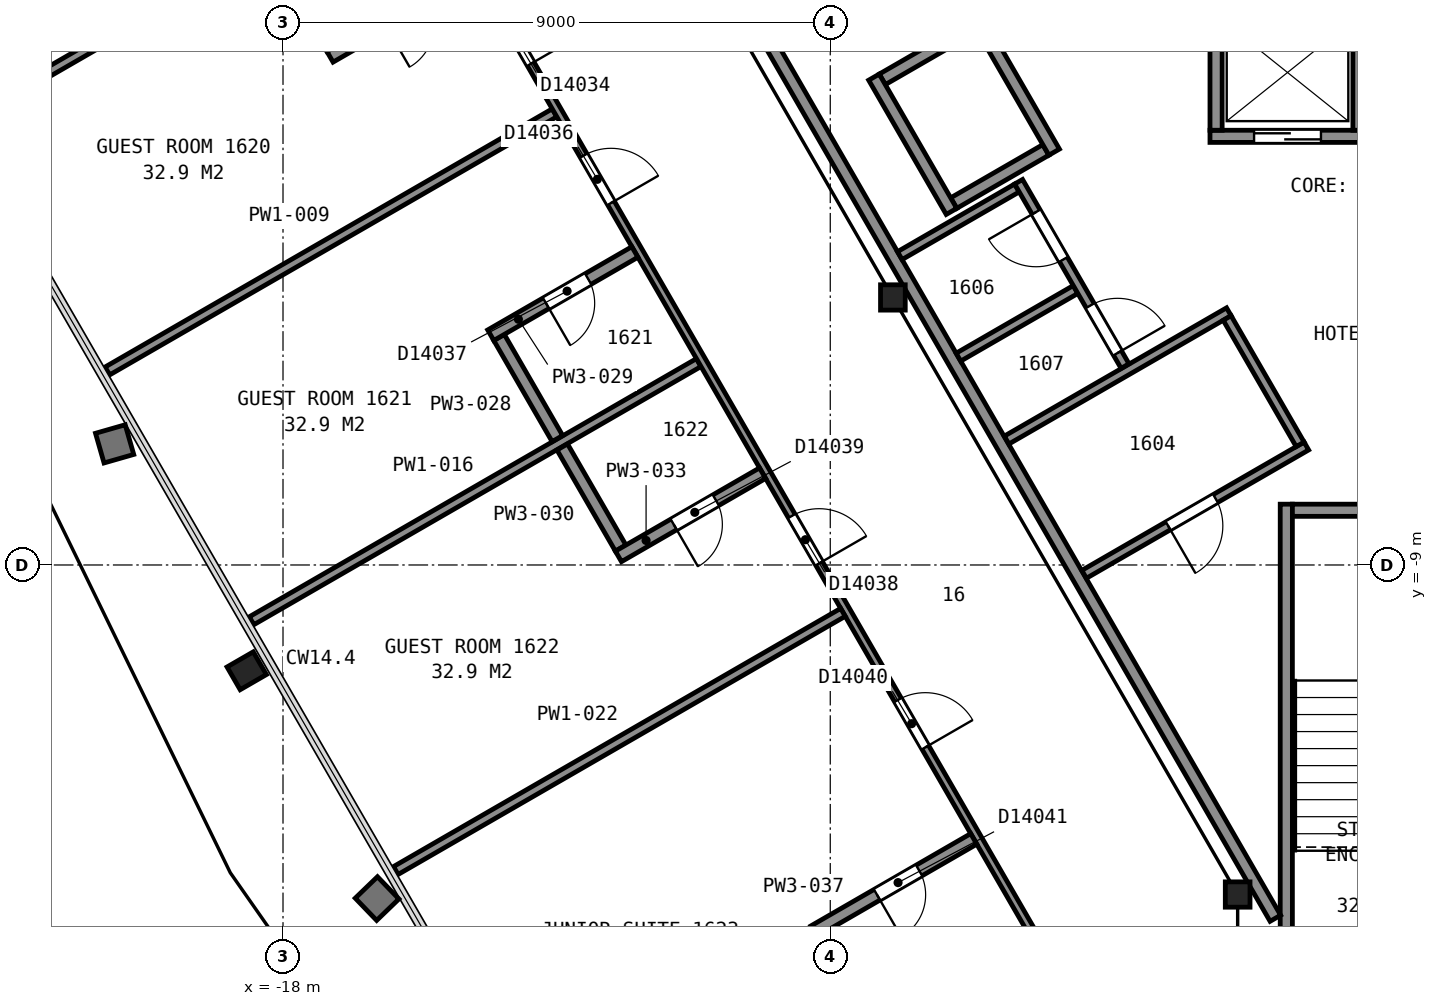
"""IFC4 building model, lengths in metres.
Left out: names, types, materials, properties, quantities, classifications, styles, units other than length and angle.
Written with IfcOpenShell. Run it as: python <this file> out.ifc"""

import sys

from ifc_helpers import new_model, si_unit, direction, frame, frame_2d, origin, origin_2d, place, context, subcontext, project, spatial, rectangle, i_section, extrude, element, fill, save


model = new_model("IFC4")
c1 = context("Model", 3, precision=1e-05, world=origin(), true_north=direction((0.0, 1.0)))
c2 = subcontext(c1, "Body", "Model", "MODEL_VIEW")
j1 = project(units=[si_unit("LENGTHUNIT", "METRE"), si_unit("PLANEANGLEUNIT", "RADIAN")], contexts=[c1])
p1 = place(None, origin())
s1 = spatial("IfcSite", under=j1, at=p1, CompositionType="ELEMENT")
p2 = place(p1, origin())
s2 = spatial("IfcBuilding", under=s1, at=p2, CompositionType="ELEMENT")
p3 = place(p2, frame((0.0, 0.0, 72.8)))
s3 = spatial("IfcBuildingStorey", under=s2, at=p3, CompositionType="ELEMENT", Elevation=72.8)
p4 = place(p3, frame((-18.512, -10.691, 0.025), z_axis=(-0.07202792121, -0.041599379805, 0.996534731038), x_axis=(-0.500403695, 0.865792204467, -2.6711735e-05)))
e1 = element("IfcColumn", 1, at=p4, inside=s3, PredefinedType="COLUMN", context=c2, shape_type="SweptSolid", body=[
    extrude(i_section(OverallWidth=0.432, OverallDepth=0.498, WebThickness=0.056, FlangeThickness=0.089, FilletRadius=0.015, at=origin_2d()), origin(), (0.0, 0.0, 1.0), 3.562),
])
for number, where, z_axis, x_axis in (
    (2, (-7.97, -4.6, 0.0), (0.0, 0.0, 1.0), (1.0, 0.0, 0.0)),
    (3, (-2.3, -14.42, 0.0), (0.0, 0.0, 1.0), (1.0, 0.0, 0.0)),
):
    element("IfcColumn", number, at=place(p3, frame(where, z_axis=z_axis, x_axis=x_axis)), inside=s3, PredefinedType="COLUMN", context=c2, shape_type="SweptSolid", body=[
        extrude(i_section(OverallWidth=0.406, OverallDepth=0.417, WebThickness=0.03, FlangeThickness=0.048, FilletRadius=0.015, at=origin_2d()), origin(), (0.0, 0.0, 1.0), 3.6),
    ])
p5 = place(p3, frame((-1.5, -8.0, 0.0), z_axis=(0.0, 0.0, 1.0), x_axis=(0.0, -1.0, 0.0)))
e4 = element("IfcWall", 4, at=p5, inside=s3, PredefinedType="PARTITIONING", context=c2, shape_type="SweptSolid", body=[
    extrude(rectangle(XDim=12.0, YDim=0.2, at=frame_2d((6.0, 0.0))), origin(), (0.0, 0.0, 1.0), 3.35),
])
p6 = place(p3, frame((-1.4, -8.1, 0.0), z_axis=(0.0, 0.0, 1.0), x_axis=(1.0, 0.0, 0.0)))
e5 = element("IfcWall", 5, at=p6, inside=s3, PredefinedType="PARTITIONING", context=c2, shape_type="SweptSolid", body=[
    extrude(rectangle(XDim=2.8, YDim=0.2, at=frame_2d((1.4, 0.0))), origin(), (0.0, 0.0, 1.0), 3.35),
])
p7 = place(p3, frame((-2.755, -1.95, 0.0), z_axis=(0.0, 0.0, 1.0), x_axis=(1.0, 0.0, 0.0)))
e6 = element("IfcWall", 6, at=p7, inside=s3, PredefinedType="PARTITIONING", context=c2, shape_type="SweptSolid", body=[
    extrude(rectangle(XDim=2.55, YDim=0.2, at=frame_2d((1.275, 0.0))), origin(), (0.0, 0.0, 1.0), 3.6),
])
p8 = place(p7, frame((0.725, 0.0, 0.0)))
e7 = element("IfcOpeningElement", 7, at=p8, cuts=e6, PredefinedType="OPENING", context=c2, shape_type="SweptSolid", body=[
    extrude(rectangle(XDim=1.1, YDim=2.1, at=frame_2d((0.55, 1.05))), frame((0.0, 0.11, 0.0), z_axis=(0.0, -1.0, 0.0), x_axis=(1.0, 0.0, 0.0)), (0.0, 0.0, 1.0), 0.22),
])
p9 = place(p3, frame((-6.97, -3.048, 0.0), z_axis=(0.0, 0.0, 1.0), x_axis=(0.866036909293, 0.499980071345, 0.0)))
e8 = element("IfcWall", 8, at=p9, inside=s3, PredefinedType="PARTITIONING", context=c2, shape_type="SweptSolid", body=[
    extrude(rectangle(XDim=1.75, YDim=0.2, at=frame_2d((0.875, 0.0))), origin(), (0.0, 0.0, 1.0), 3.6),
])
p10 = place(p3, frame((-8.145, -1.013, 0.0), z_axis=(0.0, 0.0, 1.0), x_axis=(0.866016494683, 0.500015430699, 0.0)))
e9 = element("IfcWall", 9, at=p10, inside=s3, PredefinedType="PARTITIONING", context=c2, shape_type="SweptSolid", body=[
    extrude(rectangle(XDim=3.15, YDim=0.2, at=frame_2d((1.575, 0.0))), origin(), (0.0, 0.0, 1.0), 3.6),
])
for number, where, z_axis, x_axis in (
    (10, (-0.305, -1.85, 0.0), (0.0, 0.0, 1.0), (0.0, 1.0, 0.0)),
    (11, (-2.655, -1.85, 0.0), (0.0, 0.0, 1.0), (0.0, 1.0, 0.0)),
):
    element("IfcWall", number, at=place(p3, frame(where, z_axis=z_axis, x_axis=x_axis)), inside=s3, PredefinedType="PARTITIONING", context=c2, shape_type="SweptSolid", body=[
        extrude(rectangle(XDim=1.75, YDim=0.2, at=frame_2d((0.875, 0.0))), origin(), (0.0, 0.0, 1.0), 3.6),
    ])
p11 = place(p3, frame((-5.318, -2.21, 0.0), z_axis=(0.0, 0.0, 1.0), x_axis=(-0.499938297808, 0.866061024631, 0.0)))
e12 = element("IfcWall", 12, at=p11, inside=s3, PredefinedType="PARTITIONING", context=c2, shape_type="SweptSolid", body=[
    extrude(rectangle(XDim=2.35, YDim=0.2, at=frame_2d((1.175, 0.0))), origin(), (0.0, 0.0, 1.0), 3.6),
])
p12 = place(p3, frame((-7.006, -3.185, 0.0), z_axis=(0.0, 0.0, 1.0), x_axis=(-0.499990435942, 0.866030925526, 0.0)))
e13 = element("IfcWall", 13, at=p12, inside=s3, PredefinedType="PARTITIONING", context=c2, shape_type="SweptSolid", body=[
    extrude(rectangle(XDim=2.55, YDim=0.2, at=frame_2d((1.275, 0.0))), origin(), (0.0, 0.0, 1.0), 3.6),
])
p13 = place(p3, frame((-13.664, 5.946, 0.0), z_axis=(0.0, 0.0, 1.0), x_axis=(0.499994327219, -0.866028678941, 0.0)))
e14 = element("IfcWall", 14, at=p13, inside=s3, PredefinedType="PARTITIONING", context=c2, shape_type="SweptSolid", body=[
    extrude(rectangle(XDim=23.968, YDim=0.2, at=frame_2d((11.984, 0.0))), origin(), (0.0, 0.0, 1.0), 3.35),
])
p14 = place(p3, frame((-7.856, -3.912, 0.0), z_axis=(0.0, 0.0, 1.0), x_axis=(0.865971748, 0.500092923031, 0.0)))
e15 = element("IfcWall", 15, at=p14, inside=s3, PredefinedType="PARTITIONING", context=c2, shape_type="SweptSolid", body=[
    extrude(rectangle(XDim=2.225, YDim=0.15, at=frame_2d((1.112, 0.0))), origin(), (0.0, 0.0, 1.0), 3.35),
])
p15 = place(p3, frame((-6.892, -5.582, 0.0), z_axis=(0.0, 0.0, 1.0), x_axis=(0.865944298464, 0.500140452231, 0.0)))
e16 = element("IfcWall", 16, at=p15, inside=s3, PredefinedType="PARTITIONING", context=c2, shape_type="SweptSolid", body=[
    extrude(rectangle(XDim=2.224, YDim=0.15, at=frame_2d((1.112, 0.0))), origin(), (0.0, 0.0, 1.0), 3.35),
])
p16 = place(p3, frame((-6.1, -6.946, 0.0), z_axis=(0.0, 0.0, 1.0), x_axis=(0.866038200431, 0.499977834903, 0.0)))
e17 = element("IfcWall", 17, at=p16, inside=s3, PredefinedType="PARTITIONING", context=c2, shape_type="SweptSolid", body=[
    extrude(rectangle(XDim=4.22, YDim=0.15, at=frame_2d((2.11, 0.0))), origin(), (0.0, 0.0, 1.0), 3.35),
])
p17 = place(p3, frame((-4.152, -5.729, 0.0), z_axis=(0.0, 0.0, 1.0), x_axis=(-0.500024287448, 0.866011380966, 0.0)))
e18 = element("IfcWall", 18, at=p17, inside=s3, PredefinedType="PARTITIONING", context=c2, shape_type="SweptSolid", body=[
    extrude(rectangle(XDim=3.501, YDim=0.15, at=frame_2d((1.75, 0.0))), origin(), (0.0, 0.0, 1.0), 3.35),
])
p18 = place(p17, frame((2.026, 0.0, 0.0)))
e19 = element("IfcOpeningElement", 19, at=p18, cuts=e18, PredefinedType="OPENING", context=c2, shape_type="SweptSolid", body=[
    extrude(rectangle(XDim=0.9, YDim=2.1, at=frame_2d((0.45, 1.05))), frame((0.0, 0.085, 0.0), z_axis=(0.0, -1.0, 0.0), x_axis=(1.0, 0.0, 0.0)), (0.0, 0.0, 1.0), 0.17),
])
p19 = place(p17, frame((0.248, 0.0, 0.0)))
e20 = element("IfcOpeningElement", 20, at=p19, cuts=e18, PredefinedType="OPENING", context=c2, shape_type="SweptSolid", body=[
    extrude(rectangle(XDim=0.9, YDim=2.1, at=frame_2d((0.45, 1.05))), frame((0.0, 0.085, 0.0), z_axis=(0.0, -1.0, 0.0), x_axis=(1.0, 0.0, 0.0)), (0.0, 0.0, 1.0), 0.17),
])
p20 = place(p3, frame((-4.825, -9.154, 0.0), z_axis=(0.0, 0.0, 1.0), x_axis=(0.866023738697, 0.500002884005, 0.0)))
e21 = element("IfcWall", 21, at=p20, inside=s3, PredefinedType="PARTITIONING", context=c2, shape_type="SweptSolid", body=[
    extrude(rectangle(XDim=4.22, YDim=0.15, at=frame_2d((2.11, 0.0))), origin(), (0.0, 0.0, 1.0), 3.35),
])
p21 = place(p20, frame((1.595, 0.0, 0.0)))
e22 = element("IfcOpeningElement", 22, at=p21, cuts=e21, PredefinedType="OPENING", context=c2, shape_type="SweptSolid", body=[
    extrude(rectangle(XDim=0.9, YDim=2.1, at=frame_2d((0.45, 1.05))), frame((0.0, 0.085, 0.0), z_axis=(0.0, -1.0, 0.0), x_axis=(1.0, 0.0, 0.0)), (0.0, 0.0, 1.0), 0.17),
])
p22 = place(p3, frame((-2.472, -4.938, 0.0), z_axis=(0.0, 0.0, 1.0), x_axis=(0.500045362686, -0.865999212041, 0.0)))
e23 = element("IfcWall", 23, at=p22, inside=s3, PredefinedType="PARTITIONING", context=c2, shape_type="SweptSolid", body=[
    extrude(rectangle(XDim=2.4, YDim=0.15, at=frame_2d((1.2, 0.0))), origin(), (0.0, 0.0, 1.0), 3.35),
])
p23 = place(p3, frame((-23.26, -1.701, 0.0), z_axis=(0.0, 0.0, 1.0), x_axis=(0.866027021296, 0.499997198377, 0.0)))
e24 = element("IfcWall", 24, at=p23, inside=s3, PredefinedType="PARTITIONING", context=c2, shape_type="SweptSolid", body=[
    extrude(rectangle(XDim=8.487, YDim=0.15, at=frame_2d((4.243, 0.0))), origin(), (0.0, 0.0, 1.0), 2.613),
])
p24 = place(p3, frame((-20.889, -5.809, 0.0), z_axis=(0.0, 0.0, 1.0), x_axis=(0.866022790583, 0.50000452617, 0.0)))
e25 = element("IfcWall", 25, at=p24, inside=s3, PredefinedType="PARTITIONING", context=c2, shape_type="SweptSolid", body=[
    extrude(rectangle(XDim=8.491, YDim=0.15, at=frame_2d((4.246, 0.0))), origin(), (0.0, 0.0, 1.0), 2.613),
])
p25 = place(p3, frame((-18.517, -9.917, 0.0), z_axis=(0.0, 0.0, 1.0), x_axis=(0.866017528739, 0.50001363973, 0.0)))
e26 = element("IfcWall", 26, at=p25, inside=s3, PredefinedType="PARTITIONING", context=c2, shape_type="SweptSolid", body=[
    extrude(rectangle(XDim=8.491, YDim=0.15, at=frame_2d((4.246, 0.0))), origin(), (0.0, 0.0, 1.0), 2.613),
])
p26 = place(p3, frame((-3.766, -18.358, 0.0), z_axis=(0.0, 0.0, 1.0), x_axis=(-0.500003973642, 0.866023109589, 0.0)))
e27 = element("IfcWall", 27, at=p26, inside=s3, PredefinedType="PARTITIONING", context=c2, shape_type="SweptSolid", body=[
    extrude(rectangle(XDim=28.826, YDim=0.125, at=frame_2d((14.413, 0.0))), origin(), (0.0, 0.0, 1.0), 2.613),
])
p27 = place(p26, frame((27.114, 0.0, 0.0)))
e28 = element("IfcOpeningElement", 28, at=p27, cuts=e27, PredefinedType="OPENING", context=c2, shape_type="SweptSolid", body=[
    extrude(rectangle(XDim=0.9, YDim=2.1, at=frame_2d((0.45, 1.05))), frame((0.0, 0.073, 0.0), z_axis=(0.0, -1.0, 0.0), x_axis=(1.0, 0.0, 0.0)), (0.0, 0.0, 1.0), 0.145),
])
p28 = place(p26, frame((20.322, 0.0, 0.0)))
e29 = element("IfcOpeningElement", 29, at=p28, cuts=e27, PredefinedType="OPENING", context=c2, shape_type="SweptSolid", body=[
    extrude(rectangle(XDim=0.9, YDim=2.1, at=frame_2d((0.45, 1.05))), frame((0.0, 0.073, 0.0), z_axis=(0.0, -1.0, 0.0), x_axis=(1.0, 0.0, 0.0)), (0.0, 0.0, 1.0), 0.145),
])
p29 = place(p26, frame((17.68, 0.0, 0.0)))
e30 = element("IfcOpeningElement", 30, at=p29, cuts=e27, PredefinedType="OPENING", context=c2, shape_type="SweptSolid", body=[
    extrude(rectangle(XDim=0.9, YDim=2.1, at=frame_2d((0.45, 1.05))), frame((0.0, 0.073, 0.0), z_axis=(0.0, -1.0, 0.0), x_axis=(1.0, 0.0, 0.0)), (0.0, 0.0, 1.0), 0.145),
])
p30 = place(p26, frame((10.836, 0.0, 0.0)))
e31 = element("IfcOpeningElement", 31, at=p30, cuts=e27, PredefinedType="OPENING", context=c2, shape_type="SweptSolid", body=[
    extrude(rectangle(XDim=0.9, YDim=2.1, at=frame_2d((0.45, 1.05))), frame((0.0, 0.073, 0.0), z_axis=(0.0, -1.0, 0.0), x_axis=(1.0, 0.0, 0.0)), (0.0, 0.0, 1.0), 0.145),
])
p31 = place(p26, frame((7.342, 0.0, 0.0)))
e32 = element("IfcOpeningElement", 32, at=p31, cuts=e27, PredefinedType="OPENING", context=c2, shape_type="SweptSolid", body=[
    extrude(rectangle(XDim=0.9, YDim=2.1, at=frame_2d((0.45, 1.05))), frame((0.0, 0.073, 0.0), z_axis=(0.0, -1.0, 0.0), x_axis=(1.0, 0.0, 0.0)), (0.0, 0.0, 1.0), 0.145),
])
p32 = place(p3, frame((-17.227, -0.643, 0.0), z_axis=(0.0, 0.0, 1.0), x_axis=(0.866012976267, 0.500021524473, 0.0)))
e33 = element("IfcWall", 33, at=p32, inside=s3, PredefinedType="PARTITIONING", context=c2, shape_type="SweptSolid", body=[
    extrude(rectangle(XDim=2.732, YDim=0.2, at=frame_2d((1.366, 0.0))), origin(), (0.0, 0.0, 1.0), 2.613),
])
p33 = place(p32, frame((1.05, 0.0, 0.0)))
e34 = element("IfcOpeningElement", 34, at=p33, cuts=e33, PredefinedType="OPENING", context=c2, shape_type="SweptSolid", body=[
    extrude(rectangle(XDim=0.8, YDim=2.1, at=frame_2d((0.4, 1.05))), frame((0.0, 0.11, 0.0), z_axis=(0.0, -1.0, 0.0), x_axis=(1.0, 0.0, 0.0)), (0.0, 0.0, 1.0), 0.22),
])
p34 = place(p3, frame((-16.145, -14.025, 0.0), z_axis=(0.0, 0.0, 1.0), x_axis=(0.866024716685, 0.500001190089, 0.0)))
e35 = element("IfcWall", 35, at=p34, inside=s3, PredefinedType="PARTITIONING", context=c2, shape_type="SweptSolid", body=[
    extrude(rectangle(XDim=8.492, YDim=0.15, at=frame_2d((4.246, 0.0))), origin(), (0.0, 0.0, 1.0), 2.613),
])
p35 = place(p3, frame((-14.447, -5.258, 0.0), z_axis=(0.0, 0.0, 1.0), x_axis=(0.499667418833, -0.866217334482, 0.0)))
e36 = element("IfcWall", 36, at=p35, inside=s3, PredefinedType="PARTITIONING", context=c2, shape_type="SweptSolid", body=[
    extrude(rectangle(XDim=1.92, YDim=0.2, at=frame_2d((0.96, 0.0))), origin(), (0.0, 0.0, 1.0), 2.613),
])
p36 = place(p3, frame((-12.213, -3.852, 0.0), z_axis=(0.0, 0.0, 1.0), x_axis=(-0.866005850709, -0.50003386539, 0.0)))
e37 = element("IfcWall", 37, at=p36, inside=s3, PredefinedType="PARTITIONING", context=c2, shape_type="SweptSolid", body=[
    extrude(rectangle(XDim=2.737, YDim=0.2, at=frame_2d((1.369, 0.0))), origin(), (0.0, 0.0, 1.0), 2.613),
])
p37 = place(p36, frame((0.887, 0.0, 0.0)))
e38 = element("IfcOpeningElement", 38, at=p37, cuts=e37, PredefinedType="OPENING", context=c2, shape_type="SweptSolid", body=[
    extrude(rectangle(XDim=0.8, YDim=2.1, at=frame_2d((0.4, 1.05))), frame((0.0, 0.11, 0.0), z_axis=(0.0, -1.0, 0.0), x_axis=(1.0, 0.0, 0.0)), (0.0, 0.0, 1.0), 0.22),
])
p38 = place(p3, frame((-13.407, -7.059, 0.0), z_axis=(0.0, 0.0, 1.0), x_axis=(0.499993829411, -0.866028966346, 0.0)))
e39 = element("IfcWall", 39, at=p38, inside=s3, PredefinedType="PARTITIONING", context=c2, shape_type="SweptSolid", body=[
    extrude(rectangle(XDim=1.921, YDim=0.2, at=frame_2d((0.96, 0.0))), origin(), (0.0, 0.0, 1.0), 2.613),
])
p39 = place(p3, frame((-12.484, -8.859, 0.0), z_axis=(0.0, 0.0, 1.0), x_axis=(0.866028150195, 0.499995243048, 0.0)))
e40 = element("IfcWall", 40, at=p39, inside=s3, PredefinedType="PARTITIONING", context=c2, shape_type="SweptSolid", body=[
    extrude(rectangle(XDim=2.737, YDim=0.2, at=frame_2d((1.369, 0.0))), origin(), (0.0, 0.0, 1.0), 2.613),
])
p40 = place(p39, frame((1.05, 0.0, 0.0)))
e41 = element("IfcOpeningElement", 41, at=p40, cuts=e40, PredefinedType="OPENING", context=c2, shape_type="SweptSolid", body=[
    extrude(rectangle(XDim=0.8, YDim=2.1, at=frame_2d((0.4, 1.05))), frame((0.0, 0.11, 0.0), z_axis=(0.0, -1.0, 0.0), x_axis=(1.0, 0.0, 0.0)), (0.0, 0.0, 1.0), 0.22),
])
p41 = place(p3, frame((-6.64, -13.505, 0.0), z_axis=(0.0, 0.0, 1.0), x_axis=(-0.866038344573, -0.499977585228, 0.0)))
e42 = element("IfcWall", 42, at=p41, inside=s3, PredefinedType="PARTITIONING", context=c2, shape_type="SweptSolid", body=[
    extrude(rectangle(XDim=3.037, YDim=0.2, at=frame_2d((1.519, 0.0))), origin(), (0.0, 0.0, 1.0), 2.613),
])
p42 = place(p41, frame((1.037, 0.0, 0.0)))
e43 = element("IfcOpeningElement", 43, at=p42, cuts=e42, PredefinedType="OPENING", context=c2, shape_type="SweptSolid", body=[
    extrude(rectangle(XDim=0.8, YDim=2.1, at=frame_2d((0.4, 1.05))), frame((0.0, 0.11, 0.0), z_axis=(0.0, -1.0, 0.0), x_axis=(1.0, 0.0, 0.0)), (0.0, 0.0, 1.0), 0.22),
])
p43 = place(p8, origin())
e44 = element("IfcDoor", 44, at=p43, inside=s3, OperationType="SLIDING_TO_RIGHT", PredefinedType="DOOR", context=c2, shape_type="SweptSolid", body=[
    extrude(rectangle(XDim=1.1, YDim=2.1, at=frame_2d((0.55, 1.05))), frame((0.0, 0.025, 0.0), z_axis=(0.0, -1.0, 0.0), x_axis=(1.0, 0.0, 0.0)), (0.0, 0.0, 1.0), 0.05),
])
fill(e7, e44)
p44 = place(p18, origin())
e45 = element("IfcDoor", 45, at=p44, inside=s3, OperationType="SINGLE_SWING_RIGHT", PredefinedType="DOOR", context=c2, shape_type="SweptSolid", body=[
    extrude(rectangle(XDim=0.9, YDim=2.1, at=frame_2d((0.45, 1.05))), frame((0.0, 0.025, 0.0), z_axis=(0.0, -1.0, 0.0), x_axis=(1.0, 0.0, 0.0)), (0.0, 0.0, 1.0), 0.05),
])
fill(e19, e45)
p45 = place(p19, origin())
e46 = element("IfcDoor", 46, at=p45, inside=s3, OperationType="SINGLE_SWING_LEFT", PredefinedType="DOOR", context=c2, shape_type="SweptSolid", body=[
    extrude(rectangle(XDim=0.9, YDim=2.1, at=frame_2d((0.45, 1.05))), frame((0.0, 0.025, 0.0), z_axis=(0.0, -1.0, 0.0), x_axis=(1.0, 0.0, 0.0)), (0.0, 0.0, 1.0), 0.05),
])
fill(e20, e46)
p46 = place(p21, origin())
e47 = element("IfcDoor", 47, at=p46, inside=s3, OperationType="SINGLE_SWING_LEFT", PredefinedType="DOOR", context=c2, shape_type="SweptSolid", body=[
    extrude(rectangle(XDim=0.9, YDim=2.1, at=frame_2d((0.45, 1.05))), frame((0.0, 0.025, 0.0), z_axis=(0.0, -1.0, 0.0), x_axis=(1.0, 0.0, 0.0)), (0.0, 0.0, 1.0), 0.05),
])
fill(e22, e47)
p47 = place(p28, origin())
e48 = element("IfcDoor", 48, at=p47, inside=s3, OperationType="SINGLE_SWING_LEFT", PredefinedType="DOOR", context=c2, shape_type="SweptSolid", body=[
    extrude(rectangle(XDim=0.9, YDim=2.1, at=frame_2d((0.45, 1.05))), frame((0.0, 0.025, 0.0), z_axis=(0.0, -1.0, 0.0), x_axis=(1.0, 0.0, 0.0)), (0.0, 0.0, 1.0), 0.05),
])
fill(e29, e48)
p48 = place(p29, origin())
e49 = element("IfcDoor", 49, at=p48, inside=s3, OperationType="SINGLE_SWING_LEFT", PredefinedType="DOOR", context=c2, shape_type="SweptSolid", body=[
    extrude(rectangle(XDim=0.9, YDim=2.1, at=frame_2d((0.45, 1.05))), frame((0.0, 0.025, 0.0), z_axis=(0.0, -1.0, 0.0), x_axis=(1.0, 0.0, 0.0)), (0.0, 0.0, 1.0), 0.05),
])
fill(e30, e49)
p49 = place(p30, origin())
e50 = element("IfcDoor", 50, at=p49, inside=s3, OperationType="SINGLE_SWING_LEFT", PredefinedType="DOOR", context=c2, shape_type="SweptSolid", body=[
    extrude(rectangle(XDim=0.9, YDim=2.1, at=frame_2d((0.45, 1.05))), frame((0.0, 0.025, 0.0), z_axis=(0.0, -1.0, 0.0), x_axis=(1.0, 0.0, 0.0)), (0.0, 0.0, 1.0), 0.05),
])
fill(e31, e50)
p50 = place(p31, origin())
e51 = element("IfcDoor", 51, at=p50, inside=s3, OperationType="SINGLE_SWING_LEFT", PredefinedType="DOOR", context=c2, shape_type="SweptSolid", body=[
    extrude(rectangle(XDim=0.9, YDim=2.1, at=frame_2d((0.45, 1.05))), frame((0.0, 0.025, 0.0), z_axis=(0.0, -1.0, 0.0), x_axis=(1.0, 0.0, 0.0)), (0.0, 0.0, 1.0), 0.05),
])
fill(e32, e51)
p51 = place(p37, origin())
e52 = element("IfcDoor", 52, at=p51, inside=s3, OperationType="SINGLE_SWING_RIGHT", PredefinedType="DOOR", context=c2, shape_type="SweptSolid", body=[
    extrude(rectangle(XDim=0.8, YDim=2.1, at=frame_2d((0.4, 1.05))), frame((0.0, 0.025, 0.0), z_axis=(0.0, -1.0, 0.0), x_axis=(1.0, 0.0, 0.0)), (0.0, 0.0, 1.0), 0.05),
])
fill(e38, e52)
p52 = place(p40, origin())
e53 = element("IfcDoor", 53, at=p52, inside=s3, OperationType="SINGLE_SWING_LEFT", PredefinedType="DOOR", context=c2, shape_type="SweptSolid", body=[
    extrude(rectangle(XDim=0.8, YDim=2.1, at=frame_2d((0.4, 1.05))), frame((0.0, 0.025, 0.0), z_axis=(0.0, -1.0, 0.0), x_axis=(1.0, 0.0, 0.0)), (0.0, 0.0, 1.0), 0.05),
])
fill(e41, e53)
p53 = place(p42, origin())
e54 = element("IfcDoor", 54, at=p53, inside=s3, OperationType="SINGLE_SWING_RIGHT", PredefinedType="DOOR", context=c2, shape_type="SweptSolid", body=[
    extrude(rectangle(XDim=0.8, YDim=2.1, at=frame_2d((0.4, 1.05))), frame((0.0, 0.025, 0.0), z_axis=(0.0, -1.0, 0.0), x_axis=(1.0, 0.0, 0.0)), (0.0, 0.0, 1.0), 0.05),
])
fill(e43, e54)
save(model, sys.argv[1])
